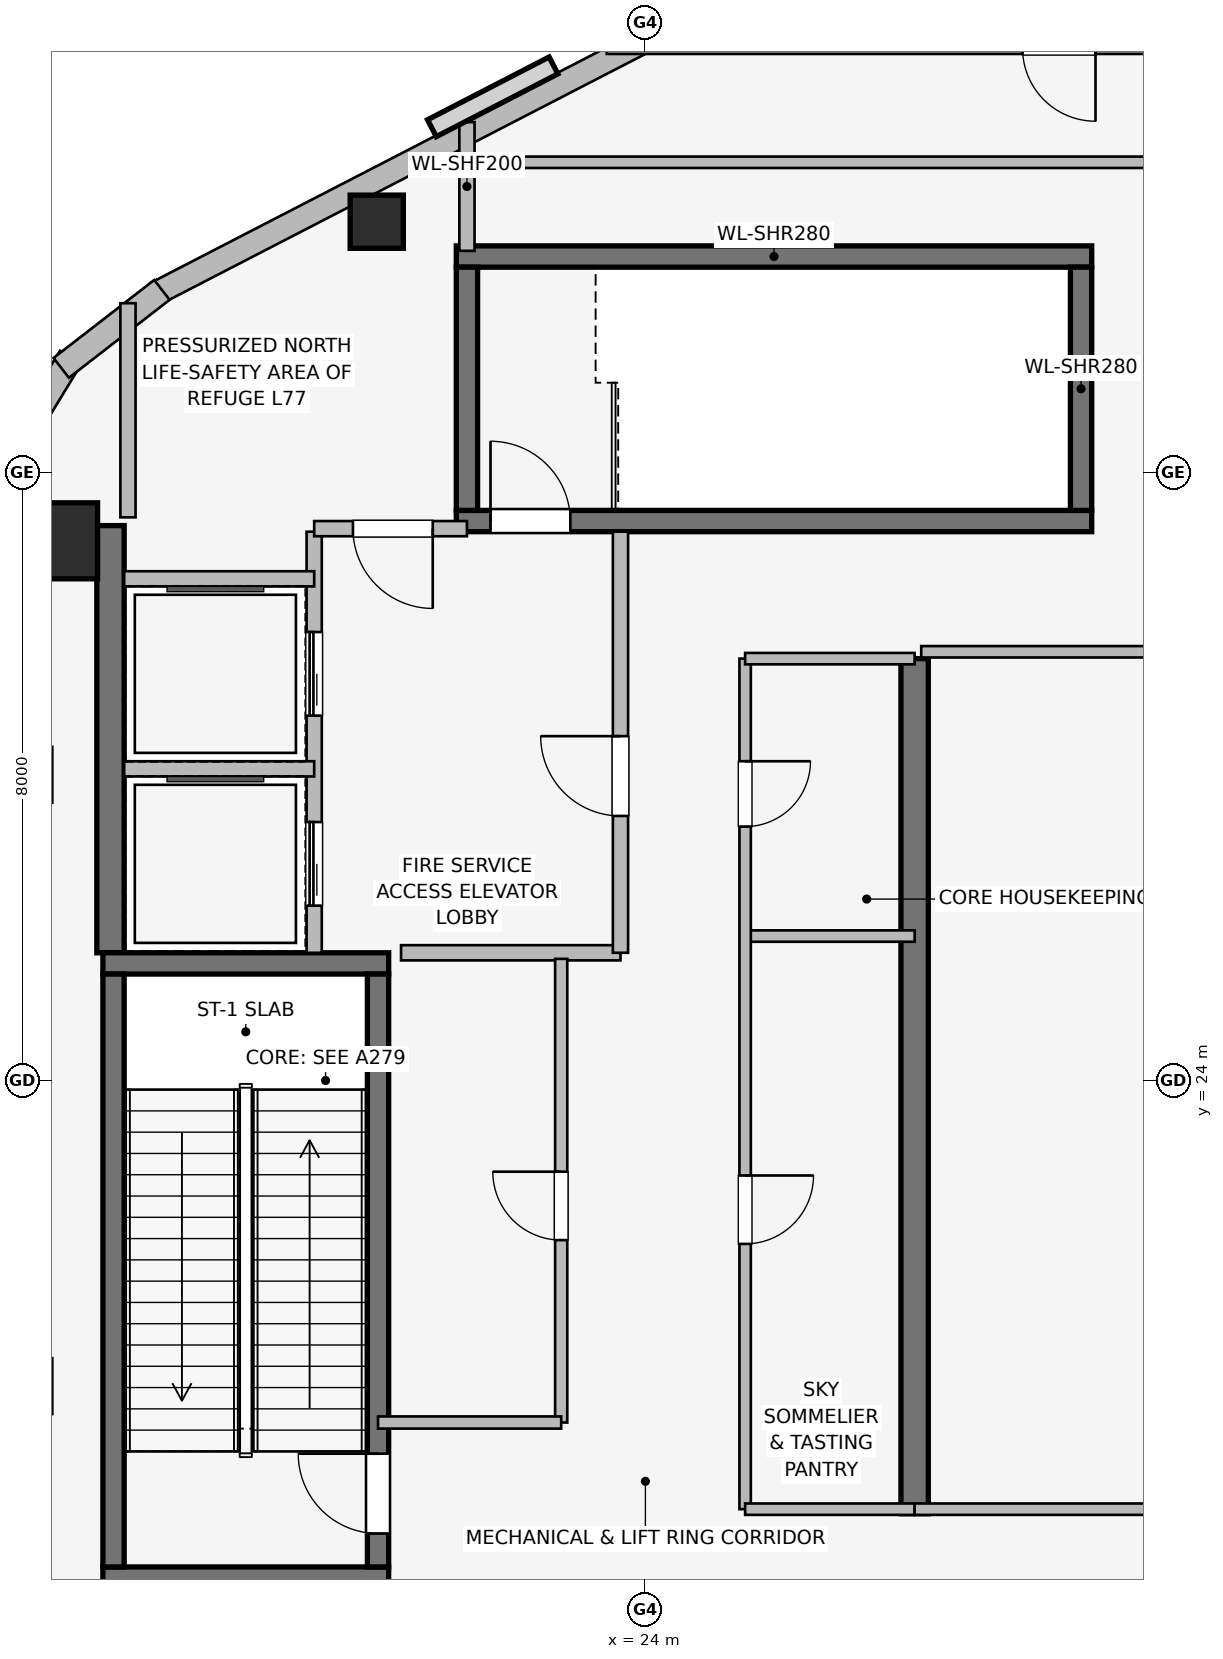
"""IFC4 building model, lengths in metres.
Left out: names, types, materials, properties, quantities, classifications, styles, units other than length and angle.
Written with IfcOpenShell. Run it as: python <this file> out.ifc"""

import sys

from ifc_helpers import new_model, si_unit, direction, frame, frame_2d, origin, origin_2d, place, context, subcontext, project, spatial, rectangle, extrude, element, fill, save


model = new_model("IFC4")
c1 = context("Model", 3, precision=1e-05, world=origin(), true_north=direction((0.0, 1.0)))
c2 = subcontext(c1, "Body", "Model", "MODEL_VIEW")
j1 = project(units=[si_unit("LENGTHUNIT", "METRE"), si_unit("PLANEANGLEUNIT", "RADIAN")], contexts=[c1])
p1 = place(None, origin())
s1 = spatial("IfcSite", under=j1, at=p1, CompositionType="ELEMENT")
p2 = place(p1, origin())
s2 = spatial("IfcBuilding", under=s1, at=p2, CompositionType="ELEMENT")
p3 = place(p2, frame((0.0, 0.0, 285.1)))
s3 = spatial("IfcBuildingStorey", under=s2, at=p3, CompositionType="ELEMENT", Elevation=285.1)
p4 = place(p3, frame((16.97, 25.68, 0.0), z_axis=(0.0, 0.0, 1.0), x_axis=(0.0, 1.0, 0.0)))
e1 = element("IfcWall", 1, at=p4, inside=s3, PredefinedType="SHEAR", context=c2, shape_type="SweptSolid", body=[
    extrude(rectangle(XDim=5.62, YDim=0.36, at=frame_2d((2.81, 0.0))), origin(), (0.0, 0.0, 1.0), 6.2),
])
p5 = place(p3, frame((27.55, 29.55, 0.0), z_axis=(0.0, 0.0, 1.0), x_axis=(0.0, -1.0, 0.0)))
e2 = element("IfcWall", 2, at=p5, inside=s3, PredefinedType="SHEAR", context=c2, shape_type="SweptSolid", body=[
    extrude(rectangle(XDim=11.25, YDim=0.36, at=frame_2d((5.625, 0.0))), origin(), (0.0, 0.0, 1.0), 6.2),
])
for number, where, z_axis, x_axis in (
    (3, (16.87, 17.46, 0.0), (0.0, 0.0, 1.0), (1.0, 0.0, 0.0)),
    (4, (20.63, 25.54, 0.0), (0.0, 0.0, 1.0), (-1.0, 0.0, 0.0)),
):
    element("IfcWall", number, at=place(p3, frame(where, z_axis=z_axis, x_axis=x_axis)), inside=s3, PredefinedType="SHEAR", context=c2, shape_type="SweptSolid", body=[
        extrude(rectangle(XDim=3.76, YDim=0.28, at=frame_2d((1.88, 0.0))), origin(), (0.0, 0.0, 1.0), 6.2),
    ])
p6 = place(p3, frame((17.01, 25.4, 0.0), z_axis=(0.0, 0.0, 1.0), x_axis=(0.0, -1.0, 0.0)))
e5 = element("IfcWall", 5, at=p6, inside=s3, PredefinedType="SHEAR", context=c2, shape_type="SweptSolid", body=[
    extrude(rectangle(XDim=7.8, YDim=0.28, at=frame_2d((3.9, 0.0))), origin(), (0.0, 0.0, 1.0), 6.2),
])
p7 = place(p3, frame((20.49, 17.6, 0.0), z_axis=(0.0, 0.0, 1.0), x_axis=(0.0, 1.0, 0.0)))
e6 = element("IfcWall", 6, at=p7, inside=s3, PredefinedType="SHEAR", context=c2, shape_type="SweptSolid", body=[
    extrude(rectangle(XDim=7.8, YDim=0.28, at=frame_2d((3.9, 0.0))), origin(), (0.0, 0.0, 1.0), 6.2),
])
p8 = place(p7, frame((0.44, 0.0, 0.0)))
e7 = element("IfcOpeningElement", 7, at=p8, cuts=e6, PredefinedType="OPENING", context=c2, shape_type="SweptSolid", body=[
    extrude(rectangle(XDim=1.05, YDim=2.0, at=frame_2d((0.525, 1.0))), frame((0.0, 0.15, 0.0), z_axis=(0.0, -1.0, 0.0), x_axis=(1.0, 0.0, 0.0)), (0.0, 0.0, 1.0), 0.3),
])
p9 = place(p3, frame((21.52, 31.36, 0.0), z_axis=(0.0, 0.0, 1.0), x_axis=(1.0, 0.0, 0.0)))
e8 = element("IfcWall", 8, at=p9, inside=s3, PredefinedType="SHEAR", context=c2, shape_type="SweptSolid", body=[
    extrude(rectangle(XDim=8.36, YDim=0.28, at=frame_2d((4.18, 0.0))), origin(), (0.0, 0.0, 1.0), 6.2),
])
p10 = place(p9, frame((0.45, 0.0, 0.0)))
e9 = element("IfcOpeningElement", 9, at=p10, cuts=e8, PredefinedType="OPENING", context=c2, shape_type="SweptSolid", body=[
    extrude(rectangle(XDim=1.05, YDim=2.0, at=frame_2d((0.525, 1.0))), frame((0.0, 0.15, 0.0), z_axis=(0.0, -1.0, 0.0), x_axis=(1.0, 0.0, 0.0)), (0.0, 0.0, 1.0), 0.3),
])
p11 = place(p3, frame((29.88, 34.84, 0.0), z_axis=(0.0, 0.0, 1.0), x_axis=(-1.0, 0.0, 0.0)))
e10 = element("IfcWall", 10, at=p11, inside=s3, PredefinedType="SHEAR", context=c2, shape_type="SweptSolid", body=[
    extrude(rectangle(XDim=8.36, YDim=0.28, at=frame_2d((4.18, 0.0))), origin(), (0.0, 0.0, 1.0), 6.2),
])
for number, where, z_axis, x_axis in (
    (11, (21.66, 34.7, 0.0), (0.0, 0.0, 1.0), (0.0, -1.0, 0.0)),
    (12, (29.74, 31.5, 0.0), (0.0, 0.0, 1.0), (0.0, 1.0, 0.0)),
):
    element("IfcWall", number, at=place(p3, frame(where, z_axis=z_axis, x_axis=x_axis)), inside=s3, PredefinedType="SHEAR", context=c2, shape_type="SweptSolid", body=[
        extrude(rectangle(XDim=3.2, YDim=0.28, at=frame_2d((1.6, 0.0))), origin(), (0.0, 0.0, 1.0), 6.2),
    ])
p12 = place(p3, frame((16.3, 31.1, 0.0), z_axis=(0.0, 0.0, 1.0), x_axis=(1.0, 0.0, 0.0)))
e13 = element("IfcColumn", 13, at=p12, inside=s3, PredefinedType="COLUMN", context=c2, shape_type="SweptSolid", body=[
    extrude(rectangle(XDim=1.0, YDim=1.0, at=origin_2d()), origin(), (0.0, 0.0, 1.0), 6.2),
])
p13 = place(p3, frame((20.473, 35.298, 0.0), z_axis=(0.0, 0.0, 1.0), x_axis=(1.0, 0.0, 0.0)))
e14 = element("IfcColumn", 14, at=p13, inside=s3, PredefinedType="COLUMN", context=c2, shape_type="SweptSolid", body=[
    extrude(rectangle(XDim=0.7, YDim=0.7, at=origin_2d()), origin(), (0.0, 0.0, 1.0), 6.2),
])
p14 = place(p3, frame((17.566, 34.354, 0.0), z_axis=(0.0, 0.0, 1.0), x_axis=(0.888581481622, 0.458718814218, 0.0)))
e15 = element("IfcWall", 15, at=p14, inside=s3, PredefinedType="STANDARD", context=c2, shape_type="SweptSolid", body=[
    extrude(rectangle(XDim=15.077, YDim=0.31, at=frame_2d((7.539, 0.0))), origin(), (0.0, 0.0, 1.0), 5.88),
])
p15 = place(p3, frame((15.574, 32.082, 0.0), z_axis=(0.0, 0.0, 1.0), x_axis=(0.520325409202, 0.853968072318, 0.0)))
e16 = element("IfcWall", 16, at=p15, inside=s3, PredefinedType="STANDARD", context=c2, shape_type="SweptSolid", body=[
    extrude(rectangle(XDim=1.678, YDim=0.33, at=frame_2d((0.839, 0.0))), origin(), (0.0, 0.0, 1.0), 5.88),
])
p16 = place(p3, frame((16.322, 33.375, 0.0), z_axis=(0.0, 0.0, 1.0), x_axis=(0.790691856293, 0.61221433207, 0.0)))
e17 = element("IfcWall", 17, at=p16, inside=s3, PredefinedType="STANDARD", context=c2, shape_type="SweptSolid", body=[
    extrude(rectangle(XDim=1.676, YDim=0.33, at=frame_2d((0.838, 0.0))), origin(), (0.0, 0.0, 1.0), 5.88),
])
p17 = place(p3, frame((19.65, 25.68, 0.0), z_axis=(0.0, 0.0, 1.0), x_axis=(0.0, 1.0, 0.0)))
e18 = element("IfcWall", 18, at=p17, inside=s3, PredefinedType="PARTITIONING", context=c2, shape_type="SweptSolid", body=[
    extrude(rectangle(XDim=5.54, YDim=0.2, at=frame_2d((2.77, 0.0))), origin(), (0.0, 0.0, 1.0), 5.88),
])
p18 = place(p17, frame((0.62, 0.0, 0.0)))
e19 = element("IfcOpeningElement", 19, at=p18, cuts=e18, PredefinedType="OPENING", context=c2, shape_type="SweptSolid", body=[
    extrude(rectangle(XDim=1.1, YDim=2.2, at=frame_2d((0.55, 1.1))), frame((0.0, 0.11, 0.0), z_axis=(0.0, -1.0, 0.0), x_axis=(1.0, 0.0, 0.0)), (0.0, 0.0, 1.0), 0.22),
])
p19 = place(p17, frame((3.12, 0.0, 0.0)))
e20 = element("IfcOpeningElement", 20, at=p19, cuts=e18, PredefinedType="OPENING", context=c2, shape_type="SweptSolid", body=[
    extrude(rectangle(XDim=1.1, YDim=2.2, at=frame_2d((0.55, 1.1))), frame((0.0, 0.11, 0.0), z_axis=(0.0, -1.0, 0.0), x_axis=(1.0, 0.0, 0.0)), (0.0, 0.0, 1.0), 0.22),
])
p20 = place(p3, frame((20.793, 25.68, 0.0), z_axis=(0.0, 0.0, 1.0), x_axis=(1.0, 0.0, 0.0)))
e21 = element("IfcWall", 21, at=p20, inside=s3, PredefinedType="PARTITIONING", context=c2, shape_type="SweptSolid", body=[
    extrude(rectangle(XDim=2.887, YDim=0.2, at=frame_2d((1.443, 0.0))), origin(), (0.0, 0.0, 1.0), 5.88),
])
p21 = place(p3, frame((23.68, 25.68, 0.0), z_axis=(0.0, 0.0, 1.0), x_axis=(0.0, 1.0, 0.0)))
e22 = element("IfcWall", 22, at=p21, inside=s3, PredefinedType="PARTITIONING", context=c2, shape_type="SweptSolid", body=[
    extrude(rectangle(XDim=5.54, YDim=0.2, at=frame_2d((2.77, 0.0))), origin(), (0.0, 0.0, 1.0), 5.88),
])
p22 = place(p21, frame((1.8, 0.0, 0.0)))
e23 = element("IfcOpeningElement", 23, at=p22, cuts=e22, PredefinedType="OPENING", context=c2, shape_type="SweptSolid", body=[
    extrude(rectangle(XDim=1.05, YDim=2.0, at=frame_2d((0.525, 1.0))), frame((0.0, 0.11, 0.0), z_axis=(0.0, -1.0, 0.0), x_axis=(1.0, 0.0, 0.0)), (0.0, 0.0, 1.0), 0.22),
])
p23 = place(p3, frame((21.66, 31.26, 0.0), z_axis=(0.0, 0.0, 1.0), x_axis=(-1.0, 0.0, 0.0)))
e24 = element("IfcWall", 24, at=p23, inside=s3, PredefinedType="PARTITIONING", context=c2, shape_type="SweptSolid", body=[
    extrude(rectangle(XDim=2.01, YDim=0.2, at=frame_2d((1.005, 0.0))), origin(), (0.0, 0.0, 1.0), 5.88),
])
p24 = place(p23, frame((0.45, 0.0, 0.0)))
e25 = element("IfcOpeningElement", 25, at=p24, cuts=e24, PredefinedType="OPENING", context=c2, shape_type="SweptSolid", body=[
    extrude(rectangle(XDim=1.05, YDim=2.0, at=frame_2d((0.525, 1.0))), frame((0.0, 0.11, 0.0), z_axis=(0.0, -1.0, 0.0), x_axis=(1.0, 0.0, 0.0)), (0.0, 0.0, 1.0), 0.22),
])
p25 = place(p3, frame((17.15, 28.1, 0.0), z_axis=(0.0, 0.0, 1.0), x_axis=(1.0, 0.0, 0.0)))
e26 = element("IfcWall", 26, at=p25, inside=s3, PredefinedType="PARTITIONING", context=c2, shape_type="SweptSolid", body=[
    extrude(rectangle(XDim=2.5, YDim=0.2, at=frame_2d((1.25, 0.0))), origin(), (0.0, 0.0, 1.0), 5.88),
])
p26 = place(p3, frame((19.65, 30.6, 0.0), z_axis=(0.0, 0.0, 1.0), x_axis=(-1.0, 0.0, 0.0)))
e27 = element("IfcWall", 27, at=p26, inside=s3, PredefinedType="PARTITIONING", context=c2, shape_type="SweptSolid", body=[
    extrude(rectangle(XDim=2.5, YDim=0.2, at=frame_2d((1.25, 0.0))), origin(), (0.0, 0.0, 1.0), 4.78),
])
p27 = place(p3, frame((22.9, 19.5, 0.0), z_axis=(0.0, 0.0, 1.0), x_axis=(0.0, 1.0, 0.0)))
e28 = element("IfcWall", 28, at=p27, inside=s3, PredefinedType="PARTITIONING", context=c2, shape_type="SweptSolid", body=[
    extrude(rectangle(XDim=6.1, YDim=0.16, at=frame_2d((3.05, 0.0))), origin(), (0.0, 0.0, 1.0), 5.88),
])
p28 = place(p27, frame((2.4, 0.0, 0.0)))
e29 = element("IfcOpeningElement", 29, at=p28, cuts=e28, PredefinedType="OPENING", context=c2, shape_type="SweptSolid", body=[
    extrude(rectangle(XDim=0.9, YDim=2.0, at=frame_2d((0.45, 1.0))), frame((0.0, 0.09, 0.0), z_axis=(0.0, -1.0, 0.0), x_axis=(1.0, 0.0, 0.0)), (0.0, 0.0, 1.0), 0.18),
])
p29 = place(p3, frame((20.49, 19.5, 0.0), z_axis=(0.0, 0.0, 1.0), x_axis=(1.0, 0.0, 0.0)))
e30 = element("IfcWall", 30, at=p29, inside=s3, PredefinedType="PARTITIONING", context=c2, shape_type="SweptSolid", body=[
    extrude(rectangle(XDim=2.41, YDim=0.16, at=frame_2d((1.205, 0.0))), origin(), (0.0, 0.0, 1.0), 4.78),
])
p30 = place(p3, frame((25.32, 25.9, 0.0), z_axis=(0.0, 0.0, 1.0), x_axis=(1.0, 0.0, 0.0)))
e31 = element("IfcWall", 31, at=p30, inside=s3, PredefinedType="PARTITIONING", context=c2, shape_type="SweptSolid", body=[
    extrude(rectangle(XDim=2.23, YDim=0.15, at=frame_2d((1.115, 0.0))), origin(), (0.0, 0.0, 1.0), 5.88),
])
p31 = place(p3, frame((25.32, 29.55, 0.0), z_axis=(0.0, 0.0, 1.0), x_axis=(0.0, -1.0, 0.0)))
e32 = element("IfcWall", 32, at=p31, inside=s3, PredefinedType="PARTITIONING", context=c2, shape_type="SweptSolid", body=[
    extrude(rectangle(XDim=11.19, YDim=0.15, at=frame_2d((5.595, 0.0))), origin(), (0.0, 0.0, 1.0), 5.88),
])
p32 = place(p31, frame((1.35, 0.0, 0.0)))
e33 = element("IfcOpeningElement", 33, at=p32, cuts=e32, PredefinedType="OPENING", context=c2, shape_type="SweptSolid", body=[
    extrude(rectangle(XDim=0.86, YDim=2.0, at=frame_2d((0.43, 1.0))), frame((0.0, 0.085, 0.0), z_axis=(0.0, -1.0, 0.0), x_axis=(1.0, 0.0, 0.0)), (0.0, 0.0, 1.0), 0.17),
])
p33 = place(p31, frame((6.8, 0.0, 0.0)))
e34 = element("IfcOpeningElement", 34, at=p33, cuts=e32, PredefinedType="OPENING", context=c2, shape_type="SweptSolid", body=[
    extrude(rectangle(XDim=0.9, YDim=2.0, at=frame_2d((0.45, 1.0))), frame((0.0, 0.085, 0.0), z_axis=(0.0, -1.0, 0.0), x_axis=(1.0, 0.0, 0.0)), (0.0, 0.0, 1.0), 0.17),
])
p34 = place(p3, frame((25.32, 18.36, 0.0), z_axis=(0.0, 0.0, 1.0), x_axis=(1.0, 0.0, 0.0)))
e35 = element("IfcWall", 35, at=p34, inside=s3, PredefinedType="PARTITIONING", context=c2, shape_type="SweptSolid", body=[
    extrude(rectangle(XDim=2.23, YDim=0.15, at=frame_2d((1.115, 0.0))), origin(), (0.0, 0.0, 1.0), 5.88),
])
p35 = place(p3, frame((27.55, 29.55, 0.0), z_axis=(0.0, 0.0, 1.0), x_axis=(-1.0, 0.0, 0.0)))
e36 = element("IfcWall", 36, at=p35, inside=s3, PredefinedType="PARTITIONING", context=c2, shape_type="SweptSolid", body=[
    extrude(rectangle(XDim=2.23, YDim=0.15, at=frame_2d((1.115, 0.0))), origin(), (0.0, 0.0, 1.0), 4.78),
])
p36 = place(p3, frame((17.2, 34.226, 0.0), z_axis=(0.0, 0.0, 1.0), x_axis=(0.0, -1.0, 0.0)))
e37 = element("IfcWall", 37, at=p36, inside=s3, PredefinedType="PARTITIONING", context=c2, shape_type="SweptSolid", body=[
    extrude(rectangle(XDim=2.817, YDim=0.2, at=frame_2d((1.409, 0.0))), origin(), (0.0, 0.0, 1.0), 5.88),
])
p37 = place(p3, frame((21.66, 34.915, 0.0), z_axis=(0.0, 0.0, 1.0), x_axis=(0.0, 1.0, 0.0)))
e38 = element("IfcWall", 38, at=p37, inside=s3, PredefinedType="PARTITIONING", context=c2, shape_type="SweptSolid", body=[
    extrude(rectangle(XDim=1.693, YDim=0.2, at=frame_2d((0.846, 0.0))), origin(), (0.0, 0.0, 1.0), 5.88),
])
p38 = place(p3, frame((27.55, 18.36, 0.0), z_axis=(0.0, 0.0, 1.0), x_axis=(1.0, 0.0, 0.0)))
e39 = element("IfcWall", 39, at=p38, inside=s3, PredefinedType="PARTITIONING", context=c2, shape_type="SweptSolid", body=[
    extrude(rectangle(XDim=12.29, YDim=0.15, at=frame_2d((6.145, 0.0))), origin(), (0.0, 0.0, 1.0), 5.021),
])
p39 = place(p38, frame((5.55, 0.0, 0.0)))
e40 = element("IfcOpeningElement", 40, at=p39, cuts=e39, PredefinedType="OPENING", context=c2, shape_type="SweptSolid", body=[
    extrude(rectangle(XDim=0.9, YDim=2.0, at=frame_2d((0.45, 1.0))), frame((0.0, 0.085, 0.0), z_axis=(0.0, -1.0, 0.0), x_axis=(1.0, 0.0, 0.0)), (0.0, 0.0, 1.0), 0.17),
])
p40 = place(p3, frame((39.84, 29.64, 0.0), z_axis=(0.0, 0.0, 1.0), x_axis=(-1.0, 0.0, 0.0)))
e41 = element("IfcWall", 41, at=p40, inside=s3, PredefinedType="PARTITIONING", context=c2, shape_type="SweptSolid", body=[
    extrude(rectangle(XDim=12.203, YDim=0.15, at=frame_2d((6.102, 0.0))), origin(), (0.0, 0.0, 1.0), 5.021),
])
p41 = place(p3, frame((34.0, 37.58, 0.0), z_axis=(0.0, 0.0, 1.0), x_axis=(-1.0, 0.0, 0.0)))
e42 = element("IfcWall", 42, at=p41, inside=s3, PredefinedType="PARTITIONING", context=c2, shape_type="SweptSolid", body=[
    extrude(rectangle(XDim=10.501, YDim=0.15, at=frame_2d((5.25, 0.0))), origin(), (0.0, 0.0, 1.0), 5.88),
])
p42 = place(p41, frame((4.07, 0.0, 0.0)))
e43 = element("IfcOpeningElement", 43, at=p42, cuts=e42, PredefinedType="OPENING", context=c2, shape_type="SweptSolid", body=[
    extrude(rectangle(XDim=0.96, YDim=2.0, at=frame_2d((0.48, 1.0))), frame((0.0, 0.085, 0.0), z_axis=(0.0, -1.0, 0.0), x_axis=(1.0, 0.0, 0.0)), (0.0, 0.0, 1.0), 0.17),
])
p43 = place(p3, frame((32.55, 36.08, 0.0), z_axis=(0.0, 0.0, 1.0), x_axis=(-1.0, 0.0, 0.0)))
e44 = element("IfcWall", 44, at=p43, inside=s3, PredefinedType="PARTITIONING", context=c2, shape_type="SweptSolid", body=[
    extrude(rectangle(XDim=10.15, YDim=0.15, at=frame_2d((5.075, 0.0))), origin(), (0.0, 0.0, 1.0), 5.88),
])
p44 = place(p8, origin())
e45 = element("IfcDoor", 45, at=p44, inside=s3, OperationType="SINGLE_SWING_RIGHT", PredefinedType="DOOR", context=c2, shape_type="SweptSolid", body=[
    extrude(rectangle(XDim=1.05, YDim=2.0, at=frame_2d((0.525, 1.0))), frame((0.0, 0.025, 0.0), z_axis=(0.0, -1.0, 0.0), x_axis=(1.0, 0.0, 0.0)), (0.0, 0.0, 1.0), 0.05),
])
fill(e7, e45)
p45 = place(p10, origin())
e46 = element("IfcDoor", 46, at=p45, inside=s3, OperationType="SINGLE_SWING_LEFT", PredefinedType="DOOR", context=c2, shape_type="SweptSolid", body=[
    extrude(rectangle(XDim=1.05, YDim=2.0, at=frame_2d((0.525, 1.0))), frame((0.0, 0.025, 0.0), z_axis=(0.0, -1.0, 0.0), x_axis=(1.0, 0.0, 0.0)), (0.0, 0.0, 1.0), 0.05),
])
fill(e9, e46)
p46 = place(p18, origin())
e47 = element("IfcDoor", 47, at=p46, inside=s3, OperationType="SLIDING_TO_LEFT", PredefinedType="DOOR", context=c2, shape_type="SweptSolid", body=[
    extrude(rectangle(XDim=1.1, YDim=2.2, at=frame_2d((0.55, 1.1))), frame((0.0, 0.025, 0.0), z_axis=(0.0, -1.0, 0.0), x_axis=(1.0, 0.0, 0.0)), (0.0, 0.0, 1.0), 0.05),
])
fill(e19, e47)
p47 = place(p19, origin())
e48 = element("IfcDoor", 48, at=p47, inside=s3, OperationType="SLIDING_TO_LEFT", PredefinedType="DOOR", context=c2, shape_type="SweptSolid", body=[
    extrude(rectangle(XDim=1.1, YDim=2.2, at=frame_2d((0.55, 1.1))), frame((0.0, 0.025, 0.0), z_axis=(0.0, -1.0, 0.0), x_axis=(1.0, 0.0, 0.0)), (0.0, 0.0, 1.0), 0.05),
])
fill(e20, e48)
p48 = place(p22, origin())
e49 = element("IfcDoor", 49, at=p48, inside=s3, OperationType="SINGLE_SWING_RIGHT", PredefinedType="DOOR", context=c2, shape_type="SweptSolid", body=[
    extrude(rectangle(XDim=1.05, YDim=2.0, at=frame_2d((0.525, 1.0))), frame((0.0, 0.025, 0.0), z_axis=(0.0, -1.0, 0.0), x_axis=(1.0, 0.0, 0.0)), (0.0, 0.0, 1.0), 0.05),
])
fill(e23, e49)
p49 = place(p24, origin())
e50 = element("IfcDoor", 50, at=p49, inside=s3, OperationType="SINGLE_SWING_LEFT", PredefinedType="DOOR", context=c2, shape_type="SweptSolid", body=[
    extrude(rectangle(XDim=1.05, YDim=2.0, at=frame_2d((0.525, 1.0))), frame((0.0, 0.025, 0.0), z_axis=(0.0, -1.0, 0.0), x_axis=(1.0, 0.0, 0.0)), (0.0, 0.0, 1.0), 0.05),
])
fill(e25, e50)
p50 = place(p28, origin())
e51 = element("IfcDoor", 51, at=p50, inside=s3, OperationType="SINGLE_SWING_RIGHT", PredefinedType="DOOR", context=c2, shape_type="SweptSolid", body=[
    extrude(rectangle(XDim=0.9, YDim=2.0, at=frame_2d((0.45, 1.0))), frame((0.0, 0.025, 0.0), z_axis=(0.0, -1.0, 0.0), x_axis=(1.0, 0.0, 0.0)), (0.0, 0.0, 1.0), 0.05),
])
fill(e29, e51)
p51 = place(p32, origin())
e52 = element("IfcDoor", 52, at=p51, inside=s3, OperationType="SINGLE_SWING_LEFT", PredefinedType="DOOR", context=c2, shape_type="SweptSolid", body=[
    extrude(rectangle(XDim=0.86, YDim=2.0, at=frame_2d((0.43, 1.0))), frame((0.0, 0.025, 0.0), z_axis=(0.0, -1.0, 0.0), x_axis=(1.0, 0.0, 0.0)), (0.0, 0.0, 1.0), 0.05),
])
fill(e33, e52)
p52 = place(p33, origin())
e53 = element("IfcDoor", 53, at=p52, inside=s3, OperationType="SINGLE_SWING_LEFT", PredefinedType="DOOR", context=c2, shape_type="SweptSolid", body=[
    extrude(rectangle(XDim=0.9, YDim=2.0, at=frame_2d((0.45, 1.0))), frame((0.0, 0.025, 0.0), z_axis=(0.0, -1.0, 0.0), x_axis=(1.0, 0.0, 0.0)), (0.0, 0.0, 1.0), 0.05),
])
fill(e34, e53)
save(model, sys.argv[1])
